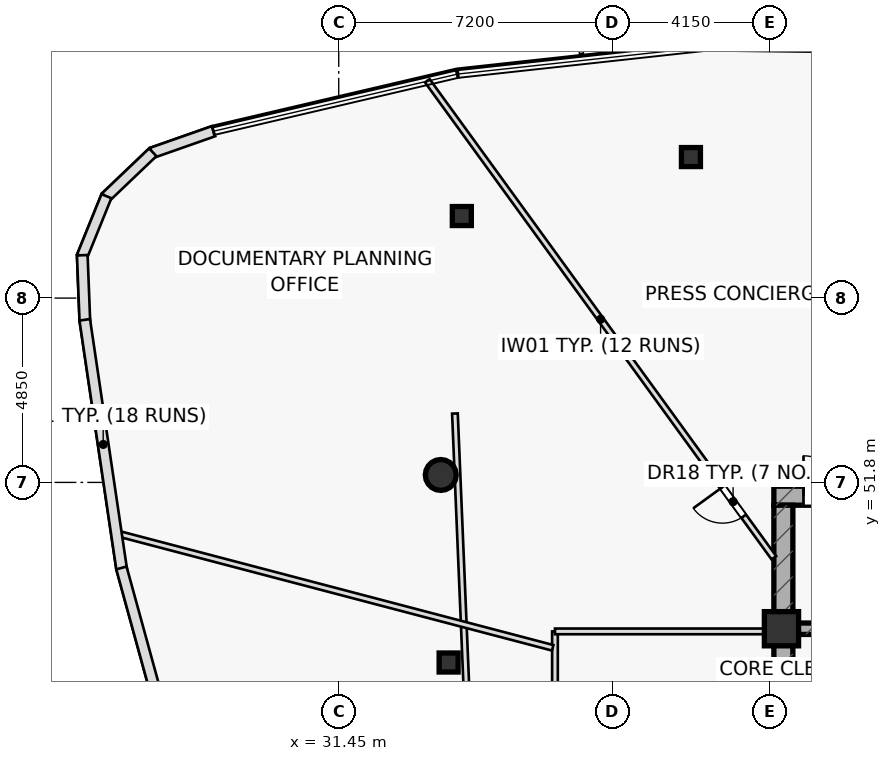
"""IFC4 building model, lengths in metres.
Left out: names, types, materials, properties, quantities, classifications, styles, units other than length and angle.
Written with IfcOpenShell. Run it as: python <this file> out.ifc"""

import sys

from ifc_helpers import new_model, si_unit, direction, frame, frame_2d, origin, origin_2d, place, context, subcontext, project, spatial, rectangle, hollow_rectangle, hollow_circle, extrude, element, fill, save


model = new_model("IFC4")
c1 = context("Model", 3, precision=1e-05, world=origin(), true_north=direction((0.0, 1.0)))
c2 = subcontext(c1, "Body", "Model", "MODEL_VIEW")
j1 = project(units=[si_unit("LENGTHUNIT", "METRE"), si_unit("PLANEANGLEUNIT", "RADIAN")], contexts=[c1])
p1 = place(None, origin())
s1 = spatial("IfcSite", under=j1, at=p1, CompositionType="ELEMENT")
p2 = place(p1, origin())
s2 = spatial("IfcBuilding", under=s1, at=p2, CompositionType="ELEMENT")
p3 = place(p2, frame((0.0, 0.0, 277.5)))
s3 = spatial("IfcBuildingStorey", under=s2, at=p3, CompositionType="ELEMENT", Elevation=277.5)
p4 = place(p3, frame((42.9, 51.45, 0.0), z_axis=(0.0, 0.0, 1.0), x_axis=(1.0, 0.0, 0.0)))
e1 = element("IfcWall", 1, at=p4, inside=s3, PredefinedType="SHEAR", context=c2, shape_type="SweptSolid", body=[
    extrude(rectangle(XDim=14.2, YDim=0.5, at=frame_2d((7.1, 0.0))), origin(), (0.0, 0.0, 1.0), 3.7),
])
p5 = place(p4, frame((0.78, 0.0, 0.0)))
e2 = element("IfcOpeningElement", 2, at=p5, cuts=e1, PredefinedType="OPENING", context=c2, shape_type="SweptSolid", body=[
    extrude(rectangle(XDim=1.05, YDim=2.2, at=frame_2d((0.525, 1.1))), frame((0.0, 0.26, 0.0), z_axis=(0.0, -1.0, 0.0), x_axis=(1.0, 0.0, 0.0)), (0.0, 0.0, 1.0), 0.52),
])
p6 = place(p3, frame((43.15, 38.8, 0.0), z_axis=(0.0, 0.0, 1.0), x_axis=(0.0, 1.0, 0.0)))
e3 = element("IfcWall", 3, at=p6, inside=s3, PredefinedType="SHEAR", context=c2, shape_type="SweptSolid", body=[
    extrude(rectangle(XDim=12.4, YDim=0.5, at=frame_2d((6.2, 0.0))), origin(), (0.0, 0.0, 1.0), 3.7),
])
p7 = place(p3, frame((43.4, 47.95, 0.0), z_axis=(0.0, 0.0, 1.0), x_axis=(1.0, 0.0, 0.0)))
e4 = element("IfcWall", 4, at=p7, inside=s3, PredefinedType="SHEAR", context=c2, shape_type="SweptSolid", body=[
    extrude(rectangle(XDim=13.2, YDim=0.3, at=frame_2d((6.6, 0.0))), origin(), (0.0, 0.0, 1.0), 3.7),
])
p8 = place(p7, frame((8.345, 0.0, 0.0)))
e5 = element("IfcOpeningElement", 5, at=p8, cuts=e4, PredefinedType="OPENING", context=c2, shape_type="SweptSolid", body=[
    extrude(rectangle(XDim=1.15, YDim=2.2, at=frame_2d((0.575, 1.1))), frame((0.0, 0.16, 0.0), z_axis=(0.0, -1.0, 0.0), x_axis=(1.0, 0.0, 0.0)), (0.0, 0.0, 1.0), 0.32),
])
p9 = place(p7, frame((10.065, 0.0, 0.0)))
e6 = element("IfcOpeningElement", 6, at=p9, cuts=e4, PredefinedType="OPENING", context=c2, shape_type="SweptSolid", body=[
    extrude(rectangle(XDim=1.15, YDim=2.2, at=frame_2d((0.575, 1.1))), frame((0.0, 0.16, 0.0), z_axis=(0.0, -1.0, 0.0), x_axis=(1.0, 0.0, 0.0)), (0.0, 0.0, 1.0), 0.32),
])
p10 = place(p7, frame((11.645, 0.0, 0.0)))
e7 = element("IfcOpeningElement", 7, at=p10, cuts=e4, PredefinedType="OPENING", context=c2, shape_type="SweptSolid", body=[
    extrude(rectangle(XDim=1.15, YDim=2.2, at=frame_2d((0.575, 1.1))), frame((0.0, 0.16, 0.0), z_axis=(0.0, -1.0, 0.0), x_axis=(1.0, 0.0, 0.0)), (0.0, 0.0, 1.0), 0.32),
])
p11 = place(p3, frame((43.1, 47.95, 0.0), z_axis=(0.0, 0.0, 1.0), x_axis=(1.0, 0.0, 0.0)))
e8 = element("IfcColumn", 8, at=p11, inside=s3, PredefinedType="COLUMN", context=c2, shape_type="SweptSolid", body=[
    extrude(rectangle(XDim=0.9, YDim=0.9, at=origin_2d()), origin(), (0.0, 0.0, 1.0), 3.7),
])
p12 = place(p3, frame((34.135, 51.996, 0.0), z_axis=(0.0, 0.0, 1.0), x_axis=(1.0, 0.0, 0.0)))
e9 = element("IfcColumn", 9, at=p12, inside=s3, PredefinedType="COLUMN", context=c2, shape_type="SweptSolid", body=[
    extrude(hollow_circle(Radius=0.406, WallThickness=0.036, at=origin_2d()), origin(), (0.0, 0.0, 1.0), 3.7),
])
for number, where, z_axis, x_axis in (
    (10, (34.342, 47.061, 0.0), (0.0, 0.0, 1.0), (1.0, 0.0, 0.0)),
    (11, (40.718, 60.361, 0.0), (0.0, 0.0, 1.0), (1.0, 0.0, 0.0)),
    (12, (34.689, 58.809, 0.0), (0.0, 0.0, 1.0), (1.0, 0.0, 0.0)),
):
    element("IfcColumn", number, at=place(p3, frame(where, z_axis=z_axis, x_axis=x_axis)), inside=s3, PredefinedType="COLUMN", context=c2, shape_type="SweptSolid", body=[
        extrude(hollow_rectangle(XDim=0.5, YDim=0.5, WallThickness=0.03, at=origin_2d()), origin(), (0.0, 0.0, 1.0), 3.7),
    ])
p13 = place(p3, frame((34.507, 53.613, 0.0), z_axis=(0.0, 0.0, 1.0), x_axis=(0.041875090182, -0.999122853718, 0.0)))
e13 = element("IfcWall", 13, at=p13, inside=s3, PredefinedType="PARTITIONING", context=c2, shape_type="SweptSolid", body=[
    extrude(rectangle(XDim=8.139, YDim=0.15, at=frame_2d((4.069, 0.0))), origin(), (0.0, 0.0, 1.0), 3.235),
])
p14 = place(p3, frame((37.14, 40.3, 0.0), z_axis=(0.0, 0.0, 1.0), x_axis=(0.0, 1.0, 0.0)))
e14 = element("IfcWall", 14, at=p14, inside=s3, PredefinedType="PARTITIONING", context=c2, shape_type="SweptSolid", body=[
    extrude(rectangle(XDim=7.58, YDim=0.15, at=frame_2d((3.79, 0.0))), origin(), (0.0, 0.0, 1.0), 3.7),
])
p15 = place(p3, frame((37.14, 47.88, 0.0), z_axis=(0.0, 0.0, 1.0), x_axis=(1.0, 0.0, 0.0)))
e15 = element("IfcWall", 15, at=p15, inside=s3, PredefinedType="PARTITIONING", context=c2, shape_type="SweptSolid", body=[
    extrude(rectangle(XDim=5.76, YDim=0.15, at=frame_2d((2.88, 0.0))), origin(), (0.0, 0.0, 1.0), 3.7),
])
p16 = place(p3, frame((42.9, 49.817, 0.0), z_axis=(0.0, 0.0, 1.0), x_axis=(-0.587773939709, 0.809025213327, 0.0)))
e16 = element("IfcWall", 16, at=p16, inside=s3, PredefinedType="PARTITIONING", context=c2, shape_type="SweptSolid", body=[
    extrude(rectangle(XDim=15.513, YDim=0.15, at=frame_2d((7.757, 0.0))), origin(), (0.0, 0.0, 1.0), 3.175),
])
p17 = place(p16, frame((1.35, 0.0, 0.0)))
e17 = element("IfcOpeningElement", 17, at=p17, cuts=e16, PredefinedType="OPENING", context=c2, shape_type="SweptSolid", body=[
    extrude(rectangle(XDim=0.95, YDim=2.05, at=frame_2d((0.475, 1.025))), frame((0.0, 0.085, 0.0), z_axis=(0.0, -1.0, 0.0), x_axis=(1.0, 0.0, 0.0)), (0.0, 0.0, 1.0), 0.17),
])
p18 = place(p3, frame((37.08, 47.448, 0.0), z_axis=(0.0, 0.0, 1.0), x_axis=(-0.967190208987, 0.254053340148, 0.0)))
e18 = element("IfcWall", 18, at=p18, inside=s3, PredefinedType="PARTITIONING", context=c2, shape_type="SweptSolid", body=[
    extrude(rectangle(XDim=11.883, YDim=0.15, at=frame_2d((5.941, 0.0))), origin(), (0.0, 0.0, 1.0), 3.175),
])
p19 = place(p3, frame((28.154, 61.041, 0.0), z_axis=(0.0, 0.0, 1.0), x_axis=(-0.943536926646, -0.331267366421, 0.0)))
e19 = element("IfcWall", 19, at=p19, inside=s3, PredefinedType="STANDARD", context=c2, shape_type="SweptSolid", body=[
    extrude(rectangle(XDim=1.719, YDim=0.28, at=frame_2d((0.86, 0.0))), origin(), (0.0, 0.0, 1.0), 3.7),
])
p20 = place(p3, frame((26.557, 60.486, 0.0), z_axis=(0.0, 0.0, 1.0), x_axis=(-0.723634593629, -0.690183290802, 0.0)))
e20 = element("IfcWall", 20, at=p20, inside=s3, PredefinedType="STANDARD", context=c2, shape_type="SweptSolid", body=[
    extrude(rectangle(XDim=1.708, YDim=0.28, at=frame_2d((0.854, 0.0))), origin(), (0.0, 0.0, 1.0), 3.7),
])
p21 = place(p3, frame((25.337, 59.332, 0.0), z_axis=(0.0, 0.0, 1.0), x_axis=(-0.37537991163, -0.926871038465, 0.0)))
e21 = element("IfcWall", 21, at=p21, inside=s3, PredefinedType="STANDARD", context=c2, shape_type="SweptSolid", body=[
    extrude(rectangle(XDim=1.708, YDim=0.28, at=frame_2d((0.854, 0.0))), origin(), (0.0, 0.0, 1.0), 3.7),
])
p22 = place(p3, frame((24.701, 57.778, 0.0), z_axis=(0.0, 0.0, 1.0), x_axis=(0.039218709703, -0.999230650455, 0.0)))
e22 = element("IfcWall", 22, at=p22, inside=s3, PredefinedType="STANDARD", context=c2, shape_type="SweptSolid", body=[
    extrude(rectangle(XDim=1.73, YDim=0.28, at=frame_2d((0.865, 0.0))), origin(), (0.0, 0.0, 1.0), 3.7),
])
p23 = place(p3, frame((24.767, 56.078, 0.0), z_axis=(0.0, 0.0, 1.0), x_axis=(0.146487270412, -0.989212555322, 0.0)))
e23 = element("IfcWall", 23, at=p23, inside=s3, PredefinedType="STANDARD", context=c2, shape_type="SweptSolid", body=[
    extrude(rectangle(XDim=6.63, YDim=0.28, at=frame_2d((3.315, 0.0))), origin(), (0.0, 0.0, 1.0), 3.7),
])
p24 = place(p3, frame((25.732, 49.549, 0.0), z_axis=(0.0, 0.0, 1.0), x_axis=(0.265108464752, -0.964218596542, 0.0)))
e24 = element("IfcWall", 24, at=p24, inside=s3, PredefinedType="STANDARD", context=c2, shape_type="SweptSolid", body=[
    extrude(rectangle(XDim=6.618, YDim=0.28, at=frame_2d((3.309, 0.0))), origin(), (0.0, 0.0, 1.0), 3.7),
])
p25 = place(p5, origin())
e25 = element("IfcDoor", 25, at=p25, inside=s3, OperationType="SINGLE_SWING_LEFT", PredefinedType="DOOR", context=c2, shape_type="SweptSolid", body=[
    extrude(rectangle(XDim=1.05, YDim=2.2, at=frame_2d((0.525, 1.1))), frame((0.0, 0.025, 0.0), z_axis=(0.0, -1.0, 0.0), x_axis=(1.0, 0.0, 0.0)), (0.0, 0.0, 1.0), 0.05),
])
fill(e2, e25)
p26 = place(p17, origin())
e26 = element("IfcDoor", 26, at=p26, inside=s3, OperationType="SINGLE_SWING_RIGHT", PredefinedType="DOOR", context=c2, shape_type="SweptSolid", body=[
    extrude(rectangle(XDim=0.95, YDim=2.05, at=frame_2d((0.475, 1.025))), frame((0.0, 0.025, 0.0), z_axis=(0.0, -1.0, 0.0), x_axis=(1.0, 0.0, 0.0)), (0.0, 0.0, 1.0), 0.05),
])
fill(e17, e26)
save(model, sys.argv[1])
